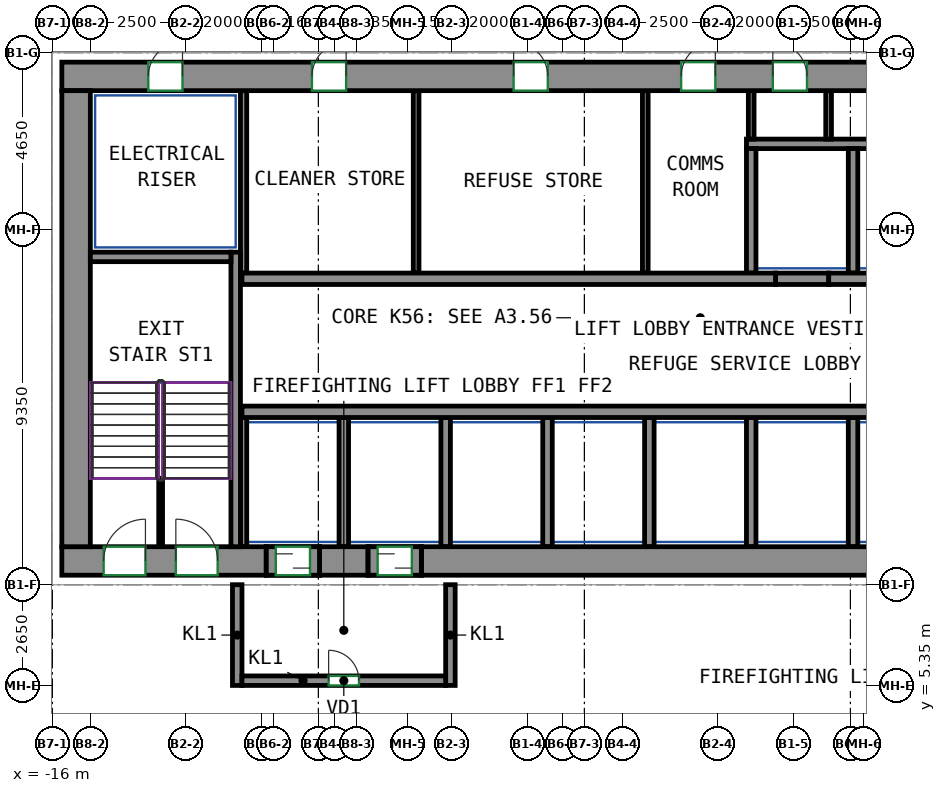
"""IFC4 building model, lengths in metres.
Left out: names, types, materials, properties, quantities, classifications, styles, units other than length and angle.
Written with IfcOpenShell. Run it as: python <this file> out.ifc"""

import sys

from ifc_helpers import new_model, si_unit, direction, frame, frame_2d, origin, place, context, subcontext, project, spatial, rectangle, extrude, source, transform, mapped, element, fill, save


model = new_model("IFC4")
c1 = context("Model", 3, precision=1e-05, world=origin(), true_north=direction((0.0, 1.0)))
c2 = subcontext(c1, "Body", "Model", "MODEL_VIEW")
j1 = project(units=[si_unit("LENGTHUNIT", "METRE"), si_unit("PLANEANGLEUNIT", "RADIAN")], contexts=[c1])
p1 = place(None, origin())
s1 = spatial("IfcSite", under=j1, at=p1, CompositionType="ELEMENT")
p2 = place(p1, origin())
s2 = spatial("IfcBuilding", under=s1, at=p2, CompositionType="ELEMENT")
p3 = place(p2, frame((0.0, 0.0, 223.7)))
s3 = spatial("IfcBuildingStorey", under=s2, at=p3, CompositionType="ELEMENT", Elevation=223.7)
m1 = source(origin(), c2, "Body", "SweptSolid", [
    extrude(rectangle(XDim=5.38, YDim=0.75, at=frame_2d((2.69, 0.0))), origin(), (0.0, 0.0, 1.0), 9.5),
])
p4 = place(p3, frame((-15.75, 8.625, 0.0), z_axis=(0.0, 0.0, 1.0), x_axis=(1.0, 0.0, 0.0)))
e1 = element("IfcWall", 1, at=p4, inside=s3, PredefinedType="SHEAR", context=c2, shape_type="MappedRepresentation", body=[
    mapped(m1, transform((0.0, 0.0, 0.0))),
])
p5 = place(p4, frame((1.1, 0.0, 0.0)))
e2 = element("IfcOpeningElement", 2, at=p5, cuts=e1, PredefinedType="OPENING", context=c2, shape_type="SweptSolid", body=[
    extrude(rectangle(XDim=1.1, YDim=2.1, at=frame_2d((0.55, 1.05))), frame((0.0, 0.385, 0.0), z_axis=(0.0, -1.0, 0.0), x_axis=(1.0, 0.0, 0.0)), (0.0, 0.0, 1.0), 0.77),
])
p6 = place(p4, frame((3.0, 0.0, 0.0)))
e3 = element("IfcOpeningElement", 3, at=p6, cuts=e1, PredefinedType="OPENING", context=c2, shape_type="SweptSolid", body=[
    extrude(rectangle(XDim=1.1, YDim=2.1, at=frame_2d((0.55, 1.05))), frame((0.0, 0.385, 0.0), z_axis=(0.0, -1.0, 0.0), x_axis=(1.0, 0.0, 0.0)), (0.0, 0.0, 1.0), 0.77),
])
m2 = source(origin(), c2, "Body", "SweptSolid", [
    extrude(rectangle(XDim=1.28, YDim=0.75, at=frame_2d((0.64, 0.0))), origin(), (0.0, 0.0, 1.0), 9.5),
])
p7 = place(p3, frame((-8.97, 8.625, 0.0), z_axis=(0.0, 0.0, 1.0), x_axis=(1.0, 0.0, 0.0)))
e4 = element("IfcWall", 4, at=p7, inside=s3, PredefinedType="SHEAR", context=c2, shape_type="MappedRepresentation", body=[
    mapped(m2, transform((0.0, 0.0, 0.0))),
])
m3 = source(origin(), c2, "Body", "SweptSolid", [
    extrude(rectangle(XDim=14.18, YDim=0.75, at=frame_2d((7.09, 0.0))), origin(), (0.0, 0.0, 1.0), 9.5),
])
p8 = place(p3, frame((-6.29, 8.625, 0.0), z_axis=(0.0, 0.0, 1.0), x_axis=(1.0, 0.0, 0.0)))
e5 = element("IfcWall", 5, at=p8, inside=s3, PredefinedType="SHEAR", context=c2, shape_type="MappedRepresentation", body=[
    mapped(m3, transform((0.0, 0.0, 0.0))),
])
m4 = source(origin(), c2, "Body", "SweptSolid", [
    extrude(rectangle(XDim=33.6, YDim=0.75, at=frame_2d((16.8, 0.0))), origin(), (0.0, 0.0, 1.0), 9.5),
])
p9 = place(p3, frame((-15.75, 21.375, 0.0), z_axis=(0.0, 0.0, 1.0), x_axis=(1.0, 0.0, 0.0)))
e6 = element("IfcWall", 6, at=p9, inside=s3, PredefinedType="SHEAR", context=c2, shape_type="MappedRepresentation", body=[
    mapped(m4, transform((0.0, 0.0, 0.0))),
])
p10 = place(p9, frame((6.581, 0.0, 0.0)))
e7 = element("IfcOpeningElement", 7, at=p10, cuts=e6, PredefinedType="OPENING", context=c2, shape_type="SweptSolid", body=[
    extrude(rectangle(XDim=0.9, YDim=2.1, at=frame_2d((0.45, 1.05))), frame((0.0, 0.385, 0.0), z_axis=(0.0, -1.0, 0.0), x_axis=(1.0, 0.0, 0.0)), (0.0, 0.0, 1.0), 0.77),
])
p11 = place(p9, frame((11.888, 0.0, 0.0)))
e8 = element("IfcOpeningElement", 8, at=p11, cuts=e6, PredefinedType="OPENING", context=c2, shape_type="SweptSolid", body=[
    extrude(rectangle(XDim=0.9, YDim=2.1, at=frame_2d((0.45, 1.05))), frame((0.0, 0.385, 0.0), z_axis=(0.0, -1.0, 0.0), x_axis=(1.0, 0.0, 0.0)), (0.0, 0.0, 1.0), 0.77),
])
p12 = place(p9, frame((16.296, 0.0, 0.0)))
e9 = element("IfcOpeningElement", 9, at=p12, cuts=e6, PredefinedType="OPENING", context=c2, shape_type="SweptSolid", body=[
    extrude(rectangle(XDim=0.9, YDim=2.1, at=frame_2d((0.45, 1.05))), frame((0.0, 0.385, 0.0), z_axis=(0.0, -1.0, 0.0), x_axis=(1.0, 0.0, 0.0)), (0.0, 0.0, 1.0), 0.77),
])
p13 = place(p9, frame((18.708, 0.0, 0.0)))
e10 = element("IfcOpeningElement", 10, at=p13, cuts=e6, PredefinedType="OPENING", context=c2, shape_type="SweptSolid", body=[
    extrude(rectangle(XDim=0.9, YDim=2.1, at=frame_2d((0.45, 1.05))), frame((0.0, 0.385, 0.0), z_axis=(0.0, -1.0, 0.0), x_axis=(1.0, 0.0, 0.0)), (0.0, 0.0, 1.0), 0.77),
])
p14 = place(p9, frame((21.536, 0.0, 0.0)))
e11 = element("IfcOpeningElement", 11, at=p14, cuts=e6, PredefinedType="OPENING", context=c2, shape_type="SweptSolid", body=[
    extrude(rectangle(XDim=0.9, YDim=2.1, at=frame_2d((0.45, 1.05))), frame((0.0, 0.385, 0.0), z_axis=(0.0, -1.0, 0.0), x_axis=(1.0, 0.0, 0.0)), (0.0, 0.0, 1.0), 0.77),
])
p15 = place(p9, frame((25.877, 0.0, 0.0)))
e12 = element("IfcOpeningElement", 12, at=p15, cuts=e6, PredefinedType="OPENING", context=c2, shape_type="SweptSolid", body=[
    extrude(rectangle(XDim=0.9, YDim=2.1, at=frame_2d((0.45, 1.05))), frame((0.0, 0.385, 0.0), z_axis=(0.0, -1.0, 0.0), x_axis=(1.0, 0.0, 0.0)), (0.0, 0.0, 1.0), 0.77),
])
p16 = place(p9, frame((2.275, 0.0, 0.0)))
e13 = element("IfcOpeningElement", 13, at=p16, cuts=e6, PredefinedType="OPENING", context=c2, shape_type="SweptSolid", body=[
    extrude(rectangle(XDim=0.9, YDim=2.1, at=frame_2d((0.45, 1.05))), frame((0.0, 0.385, 0.0), z_axis=(0.0, -1.0, 0.0), x_axis=(1.0, 0.0, 0.0)), (0.0, 0.0, 1.0), 0.77),
])
p17 = place(p9, frame((30.425, 0.0, 0.0)))
e14 = element("IfcOpeningElement", 14, at=p17, cuts=e6, PredefinedType="OPENING", context=c2, shape_type="SweptSolid", body=[
    extrude(rectangle(XDim=0.9, YDim=2.1, at=frame_2d((0.45, 1.05))), frame((0.0, 0.385, 0.0), z_axis=(0.0, -1.0, 0.0), x_axis=(1.0, 0.0, 0.0)), (0.0, 0.0, 1.0), 0.77),
])
m5 = source(origin(), c2, "Body", "SweptSolid", [
    extrude(rectangle(XDim=12.0, YDim=0.75, at=frame_2d((6.0, 0.0))), origin(), (0.0, 0.0, 1.0), 9.5),
])
p18 = place(p3, frame((-15.375, 9.0, 0.0), z_axis=(0.0, 0.0, 1.0), x_axis=(0.0, 1.0, 0.0)))
e15 = element("IfcWall", 15, at=p18, inside=s3, PredefinedType="SHEAR", context=c2, shape_type="MappedRepresentation", body=[
    mapped(m5, transform((0.0, 0.0, 0.0))),
])
m6 = source(origin(), c2, "Body", "SweptSolid", [
    extrude(rectangle(XDim=7.75, YDim=0.25, at=frame_2d((3.875, 0.0))), origin(), (0.0, 0.0, 1.0), 9.5),
])
p19 = place(p3, frame((-11.175, 9.0, 0.0), z_axis=(0.0, 0.0, 1.0), x_axis=(0.0, 1.0, 0.0)))
e16 = element("IfcWall", 16, at=p19, inside=s3, PredefinedType="SHEAR", context=c2, shape_type="MappedRepresentation", body=[
    mapped(m6, transform((0.0, 0.0, 0.0))),
])
m7 = source(origin(), c2, "Body", "SweptSolid", [
    extrude(rectangle(XDim=3.7, YDim=0.25, at=frame_2d((1.85, 0.0))), origin(), (0.0, 0.0, 1.0), 9.5),
])
p20 = place(p3, frame((-15.0, 16.625, 0.0), z_axis=(0.0, 0.0, 1.0), x_axis=(1.0, 0.0, 0.0)))
e17 = element("IfcWall", 17, at=p20, inside=s3, PredefinedType="SHEAR", context=c2, shape_type="MappedRepresentation", body=[
    mapped(m7, transform((0.0, 0.0, 0.0))),
])
m8 = source(origin(), c2, "Body", "SweptSolid", [
    extrude(rectangle(XDim=18.9, YDim=0.3, at=frame_2d((9.45, 0.0))), origin(), (0.0, 0.0, 1.0), 9.5),
])
p21 = place(p3, frame((-11.01, 12.55, 0.0), z_axis=(0.0, 0.0, 1.0), x_axis=(1.0, 0.0, 0.0)))
e18 = element("IfcWall", 18, at=p21, inside=s3, PredefinedType="SHEAR", context=c2, shape_type="MappedRepresentation", body=[
    mapped(m8, transform((0.0, 0.0, 0.0))),
])
m9 = source(origin(), c2, "Body", "SweptSolid", [
    extrude(rectangle(XDim=14.04, YDim=0.3, at=frame_2d((7.02, 0.0))), origin(), (0.0, 0.0, 1.0), 9.5),
])
p22 = place(p3, frame((-11.01, 16.05, 0.0), z_axis=(0.0, 0.0, 1.0), x_axis=(1.0, 0.0, 0.0)))
e19 = element("IfcWall", 19, at=p22, inside=s3, PredefinedType="SHEAR", context=c2, shape_type="MappedRepresentation", body=[
    mapped(m9, transform((0.0, 0.0, 0.0))),
])
m10 = source(origin(), c2, "Body", "SweptSolid", [
    extrude(rectangle(XDim=1.28, YDim=0.3, at=frame_2d((0.64, 0.0))), origin(), (0.0, 0.0, 1.0), 9.5),
])
p23 = place(p3, frame((4.43, 16.05, 0.0), z_axis=(0.0, 0.0, 1.0), x_axis=(1.0, 0.0, 0.0)))
e20 = element("IfcWall", 20, at=p23, inside=s3, PredefinedType="SHEAR", context=c2, shape_type="MappedRepresentation", body=[
    mapped(m10, transform((0.0, 0.0, 0.0))),
])
m11 = source(origin(), c2, "Body", "SweptSolid", [
    extrude(rectangle(XDim=1.4, YDim=0.75, at=frame_2d((0.7, 0.0))), origin(), (0.0, 0.0, 1.0), 5.6),
])
p24 = place(p3, frame((-10.37, 8.625, 3.9), z_axis=(0.0, 0.0, 1.0), x_axis=(1.0, 0.0, 0.0)))
e21 = element("IfcWall", 21, at=p24, inside=s3, PredefinedType="SHEAR", context=c2, shape_type="MappedRepresentation", body=[
    mapped(m11, transform((0.0, 0.0, 0.0))),
])
m12 = source(origin(), c2, "Body", "SweptSolid", [
    extrude(rectangle(XDim=1.4, YDim=0.75, at=frame_2d((0.7, 0.0))), origin(), (0.0, 0.0, 1.0), 5.55),
])
p25 = place(p3, frame((-7.69, 8.625, 3.95), z_axis=(0.0, 0.0, 1.0), x_axis=(1.0, 0.0, 0.0)))
e22 = element("IfcWall", 22, at=p25, inside=s3, PredefinedType="SHEAR", context=c2, shape_type="MappedRepresentation", body=[
    mapped(m12, transform((0.0, 0.0, 0.0))),
])
m13 = source(origin(), c2, "Body", "SweptSolid", [
    extrude(rectangle(XDim=1.4, YDim=0.3, at=frame_2d((0.7, 0.0))), origin(), (0.0, 0.0, 1.0), 9.5),
])
p26 = place(p3, frame((3.03, 16.05, 0.0), z_axis=(0.0, 0.0, 1.0), x_axis=(1.0, 0.0, 0.0)))
e23 = element("IfcWall", 23, at=p26, inside=s3, PredefinedType="PARTITIONING", context=c2, shape_type="MappedRepresentation", body=[
    mapped(m13, transform((0.0, 0.0, 0.0))),
])
m14 = source(origin(), c2, "Body", "SweptSolid", [
    extrude(rectangle(XDim=2.65, YDim=0.25, at=frame_2d((1.325, 0.0))), origin(), (0.0, 0.0, 1.0), 9.5),
])
for number, where, z_axis, x_axis in (
    (24, (-11.135, 5.35, 0.0), (0.0, 0.0, 1.0), (0.0, 1.0, 0.0)),
    (25, (-5.525, 5.35, 0.0), (0.0, 0.0, 1.0), (0.0, 1.0, 0.0)),
):
    element("IfcWall", number, at=place(p3, frame(where, z_axis=z_axis, x_axis=x_axis)), inside=s3, PredefinedType="PARTITIONING", context=c2, shape_type="MappedRepresentation", body=[
        mapped(m14, transform((0.0, 0.0, 0.0))),
    ])
m15 = source(origin(), c2, "Body", "SweptSolid", [
    extrude(rectangle(XDim=5.36, YDim=0.25, at=frame_2d((2.68, 0.0))), origin(), (0.0, 0.0, 1.0), 9.5),
])
p27 = place(p3, frame((-11.01, 5.475, 0.0), z_axis=(0.0, 0.0, 1.0), x_axis=(1.0, 0.0, 0.0)))
e26 = element("IfcWall", 26, at=p27, inside=s3, PredefinedType="PARTITIONING", context=c2, shape_type="MappedRepresentation", body=[
    mapped(m15, transform((0.0, 0.0, 0.0))),
])
p28 = place(p27, frame((2.28, 0.0, 0.0)))
e27 = element("IfcOpeningElement", 27, at=p28, cuts=e26, PredefinedType="OPENING", context=c2, shape_type="SweptSolid", body=[
    extrude(rectangle(XDim=0.8, YDim=2.0, at=frame_2d((0.4, 1.0))), frame((0.0, 0.135, 0.0), z_axis=(0.0, -1.0, 0.0), x_axis=(1.0, 0.0, 0.0)), (0.0, 0.0, 1.0), 0.27),
])
m16 = source(origin(), c2, "Body", "SweptSolid", [
    extrude(rectangle(XDim=10.97, YDim=0.25, at=frame_2d((5.485, 0.0))), origin(), (0.0, 0.0, 1.0), 9.5),
])
p29 = place(p3, frame((2.265, 19.6, 0.0), z_axis=(0.0, 0.0, 1.0), x_axis=(1.0, 0.0, 0.0)))
e28 = element("IfcWall", 28, at=p29, inside=s3, PredefinedType="PARTITIONING", context=c2, shape_type="MappedRepresentation", body=[
    mapped(m16, transform((0.0, 0.0, 0.0))),
])
m17 = source(origin(), c2, "Body", "SweptSolid", [
    extrude(rectangle(XDim=4.8, YDim=0.165, at=frame_2d((2.4, 0.0))), origin(), (0.0, 0.0, 1.0), 9.5),
])
p30 = place(p3, frame((-10.968, 16.2, 0.0), z_axis=(0.0, 0.0, 1.0), x_axis=(0.0, 1.0, 0.0)))
e29 = element("IfcWall", 29, at=p30, inside=s3, PredefinedType="PARTITIONING", context=c2, shape_type="MappedRepresentation", body=[
    mapped(m17, transform((0.0, 0.0, 0.0))),
])
m18 = source(origin(), c2, "Body", "SweptSolid", [
    extrude(rectangle(XDim=3.275, YDim=0.25, at=frame_2d((1.638, 0.0))), origin(), (0.0, 0.0, 1.0), 9.5),
])
for number, where, z_axis, x_axis in (
    (30, (2.39, 16.2, 0.0), (0.0, 0.0, 1.0), (0.0, 1.0, 0.0)),
    (31, (5.07, 16.2, 0.0), (0.0, 0.0, 1.0), (0.0, 1.0, 0.0)),
):
    element("IfcWall", number, at=place(p3, frame(where, z_axis=z_axis, x_axis=x_axis)), inside=s3, PredefinedType="PARTITIONING", context=c2, shape_type="MappedRepresentation", body=[
        mapped(m18, transform((0.0, 0.0, 0.0))),
    ])
m19 = source(origin(), c2, "Body", "SweptSolid", [
    extrude(rectangle(XDim=3.4, YDim=0.25, at=frame_2d((1.7, 0.0))), origin(), (0.0, 0.0, 1.0), 9.5),
])
for number, where, z_axis, x_axis in (
    (32, (2.39, 9.0, 0.0), (0.0, 0.0, 1.0), (0.0, 1.0, 0.0)),
    (33, (5.07, 9.0, 0.0), (0.0, 0.0, 1.0), (0.0, 1.0, 0.0)),
    (34, (-0.29, 9.0, 0.0), (0.0, 0.0, 1.0), (0.0, 1.0, 0.0)),
):
    element("IfcWall", number, at=place(p3, frame(where, z_axis=z_axis, x_axis=x_axis)), inside=s3, PredefinedType="PARTITIONING", context=c2, shape_type="MappedRepresentation", body=[
        mapped(m19, transform((0.0, 0.0, 0.0))),
    ])
m20 = source(origin(), c2, "Body", "SweptSolid", [
    extrude(rectangle(XDim=3.4, YDim=0.165, at=frame_2d((1.7, 0.0))), origin(), (0.0, 0.0, 1.0), 9.5),
])
p31 = place(p3, frame((-10.968, 9.0, 0.0), z_axis=(0.0, 0.0, 1.0), x_axis=(0.0, 1.0, 0.0)))
e35 = element("IfcWall", 35, at=p31, inside=s3, PredefinedType="PARTITIONING", context=c2, shape_type="MappedRepresentation", body=[
    mapped(m20, transform((0.0, 0.0, 0.0))),
])
for number, where, z_axis, x_axis in (
    (36, (-2.97, 9.0, 0.0), (0.0, 0.0, 1.0), (0.0, 1.0, 0.0)),
    (37, (-5.65, 9.0, 0.0), (0.0, 0.0, 1.0), (0.0, 1.0, 0.0)),
    (38, (-8.33, 9.0, 0.0), (0.0, 0.0, 1.0), (0.0, 1.0, 0.0)),
):
    element("IfcWall", number, at=place(p3, frame(where, z_axis=z_axis, x_axis=x_axis)), inside=s3, PredefinedType="PARTITIONING", context=c2, shape_type="MappedRepresentation", body=[
        mapped(m19, transform((0.0, 0.0, 0.0))),
    ])
m21 = source(origin(), c2, "Body", "SweptSolid", [
    extrude(rectangle(XDim=4.8, YDim=0.15, at=frame_2d((2.4, 0.0))), origin(), (0.0, 0.0, 1.0), 9.5),
])
for number, where, z_axis, x_axis in (
    (39, (-6.427, 16.2, 0.0), (0.0, 0.0, 1.0), (0.0, 1.0, 0.0)),
    (40, (-0.397, 16.2, 0.0), (0.0, 0.0, 1.0), (0.0, 1.0, 0.0)),
):
    element("IfcWall", number, at=place(p3, frame(where, z_axis=z_axis, x_axis=x_axis)), inside=s3, PredefinedType="PARTITIONING", context=c2, shape_type="MappedRepresentation", body=[
        mapped(m21, transform((0.0, 0.0, 0.0))),
    ])
m22 = source(origin(), c2, "Body", "SweptSolid", [
    extrude(rectangle(XDim=1.275, YDim=0.15, at=frame_2d((0.637, 0.0))), origin(), (0.0, 0.0, 1.0), 9.5),
])
for number, where, z_axis, x_axis in (
    (41, (2.39, 19.725, 0.0), (0.0, 0.0, 1.0), (0.0, 1.0, 0.0)),
    (42, (4.427, 19.725, 0.0), (0.0, 0.0, 1.0), (0.0, 1.0, 0.0)),
):
    element("IfcWall", number, at=place(p3, frame(where, z_axis=z_axis, x_axis=x_axis)), inside=s3, PredefinedType="PARTITIONING", context=c2, shape_type="MappedRepresentation", body=[
        mapped(m22, transform((0.0, 0.0, 0.0))),
    ])
m23 = source(origin(), c2, "Body", "SweptSolid", [
    extrude(rectangle(XDim=1.4, YDim=0.75, at=frame_2d((0.7, 0.0))), origin(), (0.0, 0.0, 1.0), 2.7),
])
p32 = place(p3, frame((-10.37, 8.625, 0.0), z_axis=(0.0, 0.0, 1.0), x_axis=(1.0, 0.0, 0.0)))
e43 = element("IfcWall", 43, at=p32, inside=s3, PredefinedType="PARTITIONING", context=c2, shape_type="MappedRepresentation", body=[
    mapped(m23, transform((0.0, 0.0, 0.0))),
])
p33 = place(p32, frame((0.25, 0.0, 0.0)))
e44 = element("IfcOpeningElement", 44, at=p33, cuts=e43, PredefinedType="OPENING", context=c2, shape_type="SweptSolid", body=[
    extrude(rectangle(XDim=0.9, YDim=2.1, at=frame_2d((0.45, 1.05))), frame((0.0, 0.385, 0.0), z_axis=(0.0, -1.0, 0.0), x_axis=(1.0, 0.0, 0.0)), (0.0, 0.0, 1.0), 0.77),
])
m24 = source(origin(), c2, "Body", "SweptSolid", [
    extrude(rectangle(XDim=1.4, YDim=0.75, at=frame_2d((0.7, 0.0))), origin(), (0.0, 0.0, 1.0), 2.7),
])
p34 = place(p3, frame((-7.69, 8.625, 0.0), z_axis=(0.0, 0.0, 1.0), x_axis=(1.0, 0.0, 0.0)))
e45 = element("IfcWall", 45, at=p34, inside=s3, PredefinedType="PARTITIONING", context=c2, shape_type="MappedRepresentation", body=[
    mapped(m24, transform((0.0, 0.0, 0.0))),
])
p35 = place(p34, frame((0.25, 0.0, 0.0)))
e46 = element("IfcOpeningElement", 46, at=p35, cuts=e45, PredefinedType="OPENING", context=c2, shape_type="SweptSolid", body=[
    extrude(rectangle(XDim=0.9, YDim=2.1, at=frame_2d((0.45, 1.05))), frame((0.0, 0.385, 0.0), z_axis=(0.0, -1.0, 0.0), x_axis=(1.0, 0.0, 0.0)), (0.0, 0.0, 1.0), 0.77),
])
m25 = source(origin(), c2, "Body", "SweptSolid", [
    extrude(rectangle(XDim=1.8, YDim=0.1, at=frame_2d((0.9, 0.0))), origin(), (0.0, 0.0, 1.0), 3.1),
])
p36 = place(p3, frame((-13.15, 9.0, 0.0), z_axis=(0.0, 0.0, 1.0), x_axis=(0.0, 1.0, 0.0)))
e47 = element("IfcWall", 47, at=p36, inside=s3, PredefinedType="PARTITIONING", context=c2, shape_type="MappedRepresentation", body=[
    mapped(m25, transform((0.0, 0.0, 0.0))),
])
p37 = place(p28, origin())
e48 = element("IfcDoor", 48, at=p37, inside=s3, OperationType="SINGLE_SWING_LEFT", PredefinedType="DOOR", context=c2, shape_type="SweptSolid", body=[
    extrude(rectangle(XDim=0.8, YDim=2.0, at=frame_2d((0.4, 1.0))), frame((0.0, 0.025, 0.0), z_axis=(0.0, -1.0, 0.0), x_axis=(1.0, 0.0, 0.0)), (0.0, 0.0, 1.0), 0.05),
])
fill(e27, e48)
p38 = place(p33, origin())
e49 = element("IfcDoor", 49, at=p38, inside=s3, OperationType="SLIDING_TO_LEFT", PredefinedType="DOOR", context=c2, shape_type="SweptSolid", body=[
    extrude(rectangle(XDim=0.9, YDim=2.1, at=frame_2d((0.45, 1.05))), frame((0.0, 0.28, 0.0), z_axis=(0.0, -1.0, 0.0), x_axis=(1.0, 0.0, 0.0)), (0.0, 0.0, 1.0), 0.05),
])
fill(e44, e49)
p39 = place(p35, origin())
e50 = element("IfcDoor", 50, at=p39, inside=s3, OperationType="SLIDING_TO_RIGHT", PredefinedType="DOOR", context=c2, shape_type="SweptSolid", body=[
    extrude(rectangle(XDim=0.9, YDim=2.1, at=frame_2d((0.45, 1.05))), frame((0.0, 0.28, 0.0), z_axis=(0.0, -1.0, 0.0), x_axis=(1.0, 0.0, 0.0)), (0.0, 0.0, 1.0), 0.05),
])
fill(e46, e50)
p40 = place(p10, origin())
e51 = element("IfcDoor", 51, at=p40, inside=s3, OperationType="SINGLE_SWING_RIGHT", PredefinedType="DOOR", context=c2, shape_type="SweptSolid", body=[
    extrude(rectangle(XDim=0.9, YDim=2.1, at=frame_2d((0.45, 1.05))), frame((0.0, -0.23, 0.0), z_axis=(0.0, -1.0, 0.0), x_axis=(1.0, 0.0, 0.0)), (0.0, 0.0, 1.0), 0.05),
])
fill(e7, e51)
p41 = place(p11, origin())
e52 = element("IfcDoor", 52, at=p41, inside=s3, OperationType="SINGLE_SWING_LEFT", PredefinedType="DOOR", context=c2, shape_type="SweptSolid", body=[
    extrude(rectangle(XDim=0.9, YDim=2.1, at=frame_2d((0.45, 1.05))), frame((0.0, -0.23, 0.0), z_axis=(0.0, -1.0, 0.0), x_axis=(1.0, 0.0, 0.0)), (0.0, 0.0, 1.0), 0.05),
])
fill(e8, e52)
p42 = place(p12, origin())
e53 = element("IfcDoor", 53, at=p42, inside=s3, OperationType="SINGLE_SWING_RIGHT", PredefinedType="DOOR", context=c2, shape_type="SweptSolid", body=[
    extrude(rectangle(XDim=0.9, YDim=2.1, at=frame_2d((0.45, 1.05))), frame((0.0, -0.23, 0.0), z_axis=(0.0, -1.0, 0.0), x_axis=(1.0, 0.0, 0.0)), (0.0, 0.0, 1.0), 0.05),
])
fill(e9, e53)
p43 = place(p13, origin())
e54 = element("IfcDoor", 54, at=p43, inside=s3, OperationType="SINGLE_SWING_LEFT", PredefinedType="DOOR", context=c2, shape_type="SweptSolid", body=[
    extrude(rectangle(XDim=0.9, YDim=2.1, at=frame_2d((0.45, 1.05))), frame((0.0, -0.23, 0.0), z_axis=(0.0, -1.0, 0.0), x_axis=(1.0, 0.0, 0.0)), (0.0, 0.0, 1.0), 0.05),
])
fill(e10, e54)
p44 = place(p16, origin())
e55 = element("IfcDoor", 55, at=p44, inside=s3, OperationType="SINGLE_SWING_RIGHT", PredefinedType="DOOR", context=c2, shape_type="SweptSolid", body=[
    extrude(rectangle(XDim=0.9, YDim=2.1, at=frame_2d((0.45, 1.05))), frame((0.0, -0.23, 0.0), z_axis=(0.0, -1.0, 0.0), x_axis=(1.0, 0.0, 0.0)), (0.0, 0.0, 1.0), 0.05),
])
fill(e13, e55)
p45 = place(p5, origin())
e56 = element("IfcDoor", 56, at=p45, inside=s3, OperationType="SINGLE_SWING_RIGHT", PredefinedType="DOOR", context=c2, shape_type="SweptSolid", body=[
    extrude(rectangle(XDim=1.1, YDim=2.1, at=frame_2d((0.55, 1.05))), frame((0.0, 0.28, 0.0), z_axis=(0.0, -1.0, 0.0), x_axis=(1.0, 0.0, 0.0)), (0.0, 0.0, 1.0), 0.05),
])
fill(e2, e56)
p46 = place(p6, origin())
e57 = element("IfcDoor", 57, at=p46, inside=s3, OperationType="SINGLE_SWING_LEFT", PredefinedType="DOOR", context=c2, shape_type="SweptSolid", body=[
    extrude(rectangle(XDim=1.1, YDim=2.1, at=frame_2d((0.55, 1.05))), frame((0.0, 0.28, 0.0), z_axis=(0.0, -1.0, 0.0), x_axis=(1.0, 0.0, 0.0)), (0.0, 0.0, 1.0), 0.05),
])
fill(e3, e57)
save(model, sys.argv[1])
